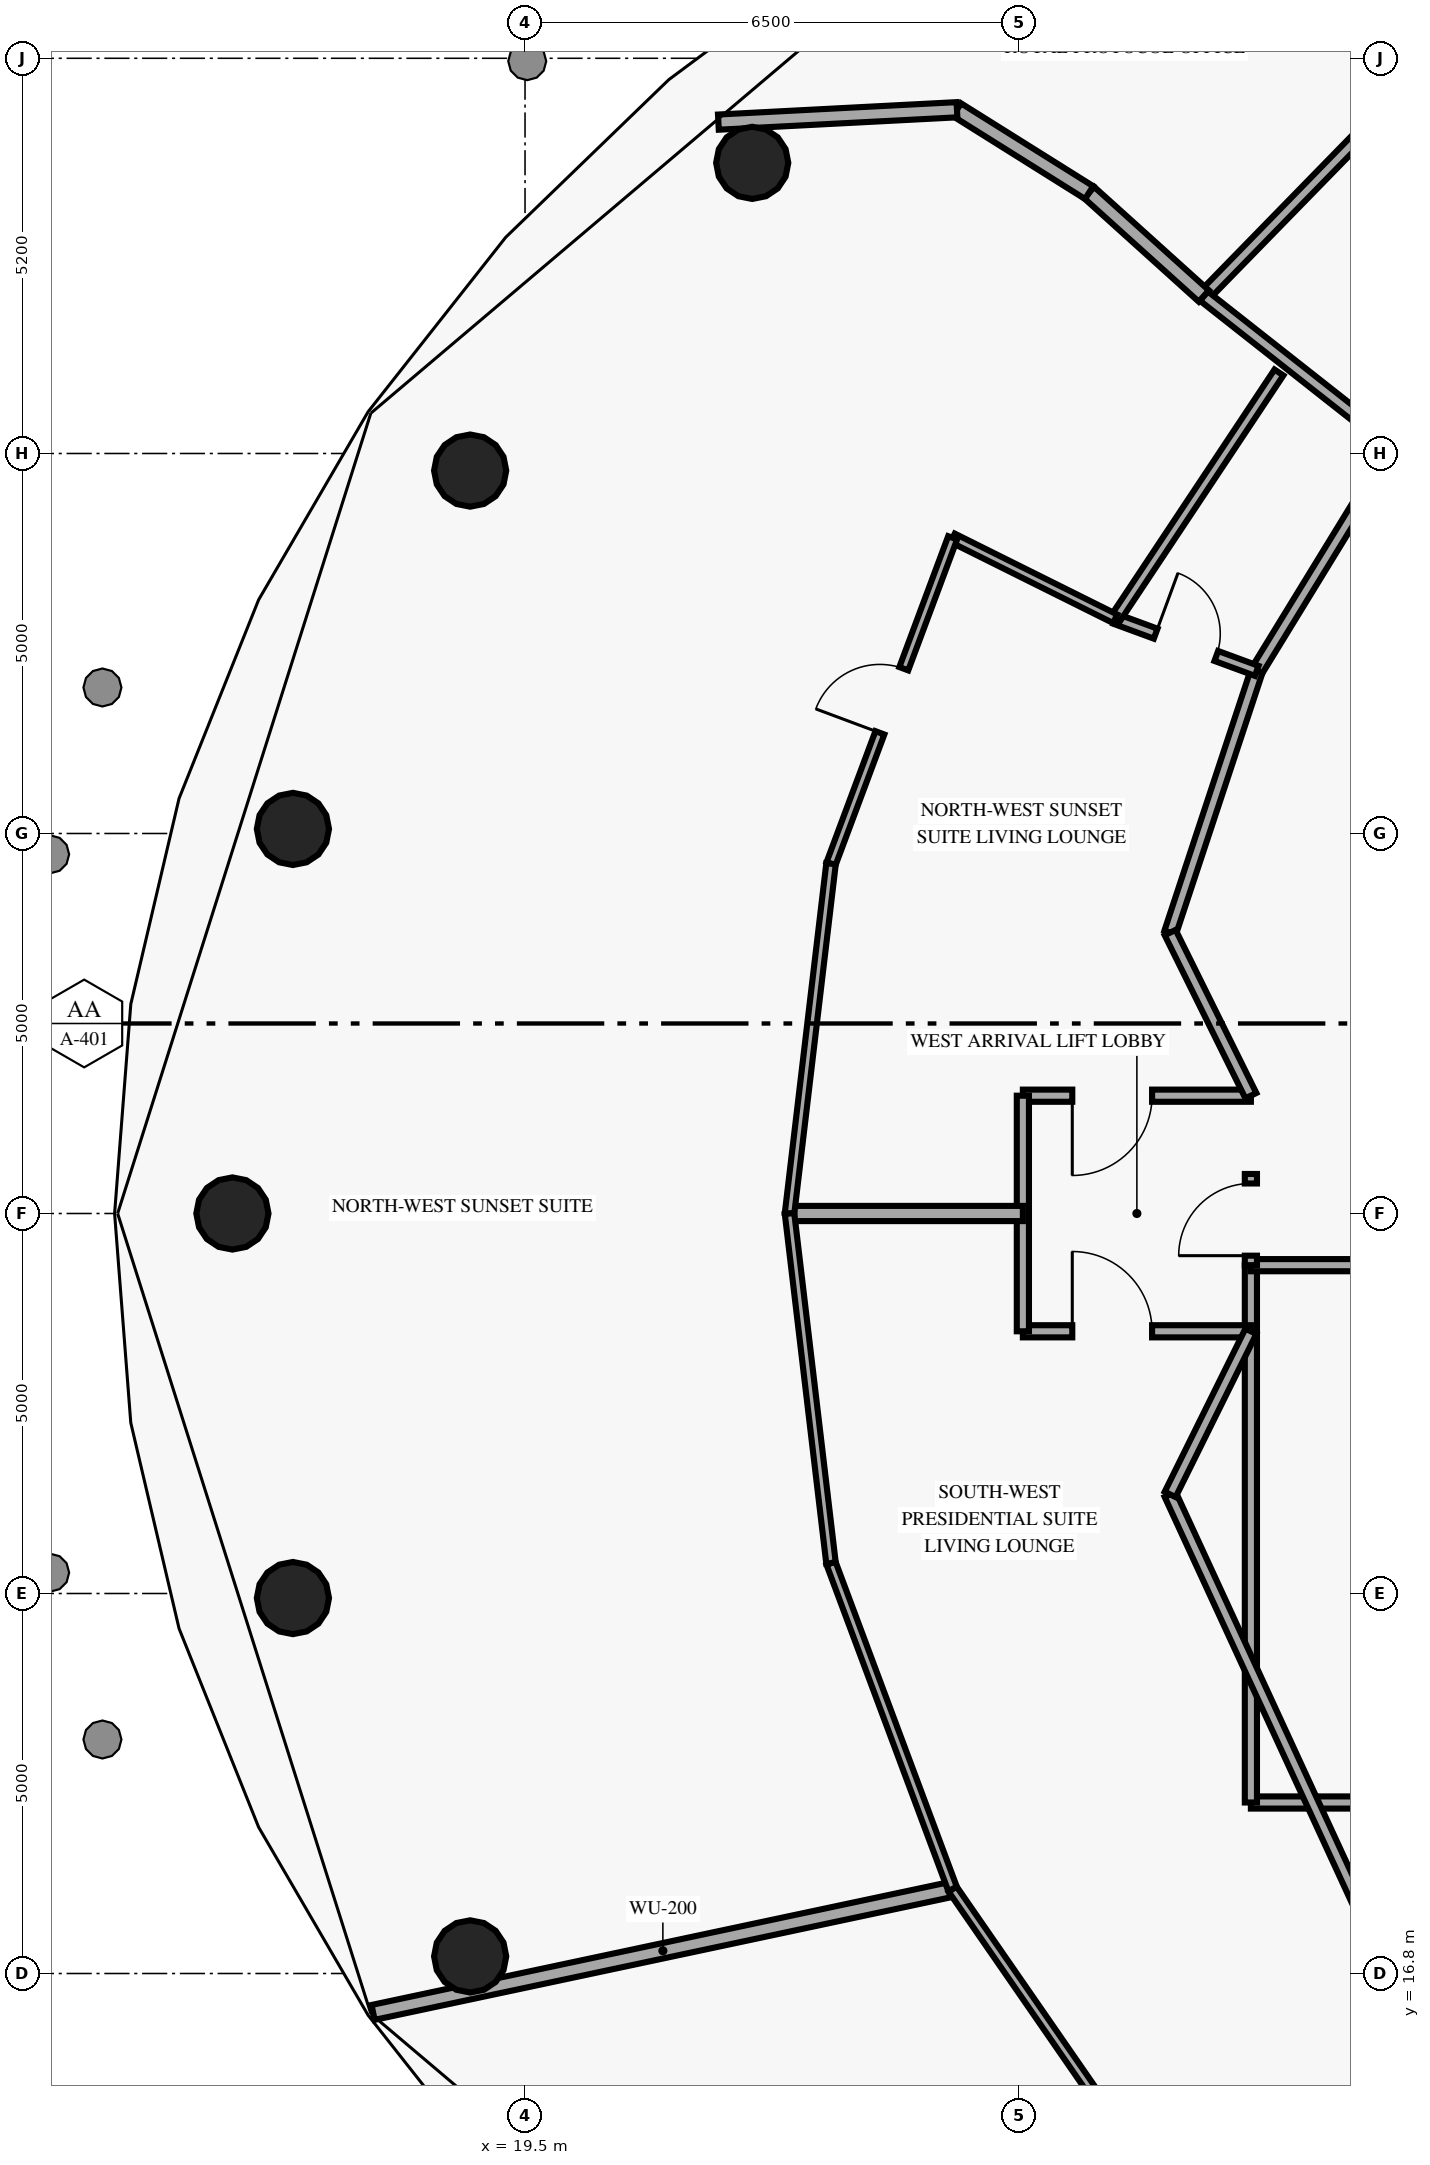
"""IFC4 building model, lengths in metres.
Left out: names, types, materials, properties, quantities, classifications, styles, units other than length and angle.
Written with IfcOpenShell. Run it as: python <this file> out.ifc"""

import sys

from ifc_helpers import new_model, si_unit, direction, frame, frame_2d, origin, origin_2d, place, context, subcontext, project, spatial, rectangle, circle, extrude, element, fill, save


model = new_model("IFC4")
c1 = context("Model", 3, precision=1e-05, world=origin(), true_north=direction((0.0, 1.0)))
c2 = subcontext(c1, "Body", "Model", "MODEL_VIEW")
j1 = project(units=[si_unit("LENGTHUNIT", "METRE"), si_unit("PLANEANGLEUNIT", "RADIAN")], contexts=[c1])
p1 = place(None, origin())
s1 = spatial("IfcSite", under=j1, at=p1, CompositionType="ELEMENT")
p2 = place(p1, origin())
s2 = spatial("IfcBuilding", under=s1, at=p2, CompositionType="ELEMENT")
p3 = place(p2, frame((0.0, 0.0, 192.25)))
s3 = spatial("IfcBuildingStorey", under=s2, at=p3, CompositionType="ELEMENT", Elevation=192.25)
for number, where, z_axis, x_axis in (
    (1, (22.489, 40.624, 0.0), (0.0, 0.0, 1.0), (1.0, 0.0, 0.0)),
    (2, (18.778, 36.575, 0.0), (0.0, 0.0, 1.0), (1.0, 0.0, 0.0)),
    (3, (16.446, 31.86, 0.0), (0.0, 0.0, 1.0), (1.0, 0.0, 0.0)),
    (4, (15.65, 26.8, 0.0), (0.0, 0.0, 1.0), (1.0, 0.0, 0.0)),
    (5, (16.446, 21.74, 0.0), (0.0, 0.0, 1.0), (1.0, 0.0, 0.0)),
    (6, (18.778, 17.025, 0.0), (0.0, 0.0, 1.0), (1.0, 0.0, 0.0)),
):
    element("IfcColumn", number, at=place(p3, frame(where, z_axis=z_axis, x_axis=x_axis)), inside=s3, PredefinedType="COLUMN", context=c2, shape_type="SweptSolid", body=[
        extrude(circle(Radius=0.475, at=origin_2d()), origin(), (0.0, 0.0, 1.0), 3.35),
    ])
p4 = place(p3, frame((29.05, 19.05, 0.0), z_axis=(0.0, 0.0, 1.0), x_axis=(1.0, 0.0, 0.0)))
e7 = element("IfcWall", 7, at=p4, inside=s3, PredefinedType="PARTITIONING", context=c2, shape_type="SweptSolid", body=[
    extrude(rectangle(XDim=4.65, YDim=0.16, at=frame_2d((2.325, 0.0))), origin(), (0.0, 0.0, 1.0), 3.35),
])
p5 = place(p3, frame((29.05, 19.05, 0.0), z_axis=(0.0, 0.0, 1.0), x_axis=(0.0, 1.0, 0.0)))
e8 = element("IfcWall", 8, at=p5, inside=s3, PredefinedType="PARTITIONING", context=c2, shape_type="SweptSolid", body=[
    extrude(rectangle(XDim=7.07, YDim=0.16, at=frame_2d((3.535, 0.0))), origin(), (0.0, 0.0, 1.0), 3.35),
])
p6 = place(p3, frame((33.7, 26.12, 0.0), z_axis=(0.0, 0.0, 1.0), x_axis=(-1.0, 0.0, 0.0)))
e9 = element("IfcWall", 9, at=p6, inside=s3, PredefinedType="PARTITIONING", context=c2, shape_type="SweptSolid", body=[
    extrude(rectangle(XDim=4.65, YDim=0.16, at=frame_2d((2.325, 0.0))), origin(), (0.0, 0.0, 1.0), 3.35),
])
p7 = place(p6, frame((1.875, 0.0, 0.0)))
e10 = element("IfcOpeningElement", 10, at=p7, cuts=e9, PredefinedType="OPENING", context=c2, shape_type="SweptSolid", body=[
    extrude(rectangle(XDim=0.9, YDim=2.1, at=frame_2d((0.45, 1.05))), frame((0.0, 0.09, 0.0), z_axis=(0.0, -1.0, 0.0), x_axis=(1.0, 0.0, 0.0)), (0.0, 0.0, 1.0), 0.18),
])
p8 = place(p3, frame((29.05, 26.12, 0.0), z_axis=(0.0, 0.0, 1.0), x_axis=(0.0, 1.0, 0.0)))
e11 = element("IfcWall", 11, at=p8, inside=s3, PredefinedType="PARTITIONING", context=c2, shape_type="SweptSolid", body=[
    extrude(rectangle(XDim=1.2, YDim=0.16, at=frame_2d((0.6, 0.0))), origin(), (0.0, 0.0, 1.0), 3.35),
])
p9 = place(p8, frame((0.125, 0.0, 0.0)))
e12 = element("IfcOpeningElement", 12, at=p9, cuts=e11, PredefinedType="OPENING", context=c2, shape_type="SweptSolid", body=[
    extrude(rectangle(XDim=0.95, YDim=2.15, at=frame_2d((0.475, 1.075))), frame((0.0, 0.09, 0.0), z_axis=(0.0, -1.0, 0.0), x_axis=(1.0, 0.0, 0.0)), (0.0, 0.0, 1.0), 0.18),
])
p10 = place(p3, frame((31.374, 41.888, 0.0), z_axis=(0.0, 0.0, 1.0), x_axis=(-0.698421583202, -0.715686587913, 0.0)))
e13 = element("IfcWall", 13, at=p10, inside=s3, PredefinedType="PARTITIONING", context=c2, shape_type="SweptSolid", body=[
    extrude(rectangle(XDim=4.214, YDim=0.16, at=frame_2d((2.107, 0.0))), origin(), (0.0, 0.0, 1.0), 3.35),
])
p11 = place(p3, frame((30.939, 36.897, 0.0), z_axis=(0.0, 0.0, 1.0), x_axis=(-0.785635850026, 0.618689187843, 0.0)))
e14 = element("IfcWall", 14, at=p11, inside=s3, PredefinedType="PARTITIONING", context=c2, shape_type="SweptSolid", body=[
    extrude(rectangle(XDim=3.192, YDim=0.16, at=frame_2d((1.596, 0.0))), origin(), (0.0, 0.0, 1.0), 3.35),
])
p12 = place(p3, frame((28.431, 38.872, 0.0), z_axis=(0.0, 0.0, 1.0), x_axis=(-0.742576754187, 0.669760975379, 0.0)))
e15 = element("IfcWall", 15, at=p12, inside=s3, PredefinedType="PARTITIONING", context=c2, shape_type="SweptSolid", body=[
    extrude(rectangle(XDim=2.032, YDim=0.2, at=frame_2d((1.016, 0.0))), origin(), (0.0, 0.0, 1.0), 3.35),
])
p13 = place(p3, frame((26.922, 40.233, 0.0), z_axis=(0.0, 0.0, 1.0), x_axis=(-0.847295877025, 0.53112116958, 0.0)))
e16 = element("IfcWall", 16, at=p13, inside=s3, PredefinedType="PARTITIONING", context=c2, shape_type="SweptSolid", body=[
    extrude(rectangle(XDim=2.052, YDim=0.2, at=frame_2d((1.026, 0.0))), origin(), (0.0, 0.0, 1.0), 3.35),
])
p14 = place(p3, frame((25.183, 41.323, 0.0), z_axis=(0.0, 0.0, 1.0), x_axis=(-0.9986532157, -0.051882123821, 0.0)))
e17 = element("IfcWall", 17, at=p14, inside=s3, PredefinedType="PARTITIONING", context=c2, shape_type="SweptSolid", body=[
    extrude(rectangle(XDim=3.143, YDim=0.2, at=frame_2d((1.572, 0.0))), origin(), (0.0, 0.0, 1.0), 3.35),
])
p15 = place(p3, frame((30.939, 36.897, 0.0), z_axis=(0.0, 0.0, 1.0), x_axis=(-0.522486120877, -0.852647789823, 0.0)))
e18 = element("IfcWall", 18, at=p15, inside=s3, PredefinedType="PARTITIONING", context=c2, shape_type="SweptSolid", body=[
    extrude(rectangle(XDim=3.468, YDim=0.16, at=frame_2d((1.734, 0.0))), origin(), (0.0, 0.0, 1.0), 3.35),
])
p16 = place(p3, frame((29.127, 33.94, 0.0), z_axis=(0.0, 0.0, 1.0), x_axis=(-0.313985571683, -0.949427754374, 0.0)))
e19 = element("IfcWall", 19, at=p16, inside=s3, PredefinedType="PARTITIONING", context=c2, shape_type="SweptSolid", body=[
    extrude(rectangle(XDim=3.627, YDim=0.16, at=frame_2d((1.813, 0.0))), origin(), (0.0, 0.0, 1.0), 3.35),
])
p17 = place(p3, frame((27.988, 23.104, 0.0), z_axis=(0.0, 0.0, 1.0), x_axis=(0.418656179426, -0.908144814128, 0.0)))
e20 = element("IfcWall", 20, at=p17, inside=s3, PredefinedType="PARTITIONING", context=c2, shape_type="SweptSolid", body=[
    extrude(rectangle(XDim=7.049, YDim=0.16, at=frame_2d((3.524, 0.0))), origin(), (0.0, 0.0, 1.0), 3.35),
])
p18 = place(p3, frame((26.05, 28.35, 0.0), z_axis=(0.0, 0.0, 1.0), x_axis=(1.0, 0.0, 0.0)))
e21 = element("IfcWall", 21, at=p18, inside=s3, PredefinedType="PARTITIONING", context=c2, shape_type="SweptSolid", body=[
    extrude(rectangle(XDim=3.0, YDim=0.16, at=frame_2d((1.5, 0.0))), origin(), (0.0, 0.0, 1.0), 2.31),
])
p19 = place(p18, frame((0.65, 0.0, 0.0)))
e22 = element("IfcOpeningElement", 22, at=p19, cuts=e21, PredefinedType="OPENING", context=c2, shape_type="SweptSolid", body=[
    extrude(rectangle(XDim=1.05, YDim=2.15, at=frame_2d((0.525, 1.075))), frame((0.0, 0.09, 0.0), z_axis=(0.0, -1.0, 0.0), x_axis=(1.0, 0.0, 0.0)), (0.0, 0.0, 1.0), 0.18),
])
p20 = place(p3, frame((26.05, 25.25, 0.0), z_axis=(0.0, 0.0, 1.0), x_axis=(1.0, 0.0, 0.0)))
e23 = element("IfcWall", 23, at=p20, inside=s3, PredefinedType="PARTITIONING", context=c2, shape_type="SweptSolid", body=[
    extrude(rectangle(XDim=3.0, YDim=0.16, at=frame_2d((1.5, 0.0))), origin(), (0.0, 0.0, 1.0), 3.35),
])
p21 = place(p20, frame((0.65, 0.0, 0.0)))
e24 = element("IfcOpeningElement", 24, at=p21, cuts=e23, PredefinedType="OPENING", context=c2, shape_type="SweptSolid", body=[
    extrude(rectangle(XDim=1.05, YDim=2.15, at=frame_2d((0.525, 1.075))), frame((0.0, 0.09, 0.0), z_axis=(0.0, -1.0, 0.0), x_axis=(1.0, 0.0, 0.0)), (0.0, 0.0, 1.0), 0.18),
])
p22 = place(p3, frame((26.05, 25.25, 0.0), z_axis=(0.0, 0.0, 1.0), x_axis=(0.0, 1.0, 0.0)))
e25 = element("IfcWall", 25, at=p22, inside=s3, PredefinedType="PARTITIONING", context=c2, shape_type="SweptSolid", body=[
    extrude(rectangle(XDim=3.1, YDim=0.16, at=frame_2d((1.55, 0.0))), origin(), (0.0, 0.0, 1.0), 3.35),
])
for number, where, z_axis, x_axis in (
    (26, (27.988, 30.496, 0.0), (0.0, 0.0, 1.0), (0.444, -0.896, 0.0)),
    (27, (27.988, 23.104, 0.0), (0.0, 0.0, 1.0), (0.444, 0.896, 0.0)),
):
    element("IfcWall", number, at=place(p3, frame(where, z_axis=z_axis, x_axis=x_axis)), inside=s3, PredefinedType="PARTITIONING", context=c2, shape_type="SweptSolid", body=[
        extrude(rectangle(XDim=2.394, YDim=0.16, at=frame_2d((1.197, 0.0))), origin(), (0.0, 0.0, 1.0), 3.35),
    ])
p23 = place(p3, frame((26.05, 26.8, 0.0), z_axis=(0.0, 0.0, 1.0), x_axis=(-1.0, 0.0, 0.0)))
e28 = element("IfcWall", 28, at=p23, inside=s3, PredefinedType="PARTITIONING", context=c2, shape_type="SweptSolid", body=[
    extrude(rectangle(XDim=3.07, YDim=0.2, at=frame_2d((1.535, 0.0))), origin(), (0.0, 0.0, 1.0), 3.35),
])
p24 = place(p3, frame((25.126, 17.91, 0.0), z_axis=(0.0, 0.0, 1.0), x_axis=(-0.978119354701, -0.208044533596, 0.0)))
e29 = element("IfcWall", 29, at=p24, inside=s3, PredefinedType="PARTITIONING", context=c2, shape_type="SweptSolid", body=[
    extrude(rectangle(XDim=7.796, YDim=0.2, at=frame_2d((3.898, 0.0))), origin(), (0.0, 0.0, 1.0), 3.35),
])
p25 = place(p3, frame((27.265, 34.625, 0.0), z_axis=(0.0, 0.0, 1.0), x_axis=(0.938500583084, -0.345277649945, 0.0)))
e30 = element("IfcWall", 30, at=p25, inside=s3, PredefinedType="PARTITIONING", context=c2, shape_type="SweptSolid", body=[
    extrude(rectangle(XDim=1.984, YDim=0.14, at=frame_2d((0.992, 0.0))), origin(), (0.0, 0.0, 1.0), 3.35),
])
p26 = place(p25, frame((0.567, 0.0, 0.0)))
e31 = element("IfcOpeningElement", 31, at=p26, cuts=e30, PredefinedType="OPENING", context=c2, shape_type="SweptSolid", body=[
    extrude(rectangle(XDim=0.85, YDim=2.1, at=frame_2d((0.425, 1.05))), frame((0.0, 0.08, 0.0), z_axis=(0.0, -1.0, 0.0), x_axis=(1.0, 0.0, 0.0)), (0.0, 0.0, 1.0), 0.16),
])
p27 = place(p3, frame((29.419, 37.866, 0.0), z_axis=(0.0, 0.0, 1.0), x_axis=(-0.553526949376, -0.832831265212, 0.0)))
e32 = element("IfcWall", 32, at=p27, inside=s3, PredefinedType="PARTITIONING", context=c2, shape_type="SweptSolid", body=[
    extrude(rectangle(XDim=3.892, YDim=0.14, at=frame_2d((1.946, 0.0))), origin(), (0.0, 0.0, 1.0), 3.35),
])
p28 = place(p3, frame((27.265, 34.625, 0.0), z_axis=(0.0, 0.0, 1.0), x_axis=(-0.895182030291, 0.445700720937, 0.0)))
e33 = element("IfcWall", 33, at=p28, inside=s3, PredefinedType="PARTITIONING", context=c2, shape_type="SweptSolid", body=[
    extrude(rectangle(XDim=2.389, YDim=0.125, at=frame_2d((1.195, 0.0))), origin(), (0.0, 0.0, 1.0), 3.35),
])
p29 = place(p3, frame((25.126, 35.69, 0.0), z_axis=(0.0, 0.0, 1.0), x_axis=(-0.349620571525, -0.936891378958, 0.0)))
e34 = element("IfcWall", 34, at=p29, inside=s3, PredefinedType="PARTITIONING", context=c2, shape_type="SweptSolid", body=[
    extrude(rectangle(XDim=4.577, YDim=0.125, at=frame_2d((2.288, 0.0))), origin(), (0.0, 0.0, 1.0), 3.35),
])
p30 = place(p29, frame((1.838, 0.0, 0.0)))
e35 = element("IfcOpeningElement", 35, at=p30, cuts=e34, PredefinedType="OPENING", context=c2, shape_type="SweptSolid", body=[
    extrude(rectangle(XDim=0.9, YDim=2.1, at=frame_2d((0.45, 1.05))), frame((0.0, 0.073, 0.0), z_axis=(0.0, -1.0, 0.0), x_axis=(1.0, 0.0, 0.0)), (0.0, 0.0, 1.0), 0.145),
])
for number, where, z_axis, x_axis in (
    (36, (23.526, 31.402, 0.0), (0.0, 0.0, 1.0), (-0.118, -0.993, 0.0)),
    (37, (22.98, 26.8, 0.0), (0.0, 0.0, 1.0), (0.118, -0.993, 0.0)),
):
    element("IfcWall", number, at=place(p3, frame(where, z_axis=z_axis, x_axis=x_axis)), inside=s3, PredefinedType="PARTITIONING", context=c2, shape_type="SweptSolid", body=[
        extrude(rectangle(XDim=4.634, YDim=0.125, at=frame_2d((2.317, 0.0))), origin(), (0.0, 0.0, 1.0), 3.35),
    ])
p31 = place(p3, frame((23.526, 22.198, 0.0), z_axis=(0.0, 0.0, 1.0), x_axis=(0.349603098964, -0.936897899024, 0.0)))
e38 = element("IfcWall", 38, at=p31, inside=s3, PredefinedType="PARTITIONING", context=c2, shape_type="SweptSolid", body=[
    extrude(rectangle(XDim=4.577, YDim=0.125, at=frame_2d((2.289, 0.0))), origin(), (0.0, 0.0, 1.0), 3.35),
])
p32 = place(p3, frame((25.126, 17.91, 0.0), z_axis=(0.0, 0.0, 1.0), x_axis=(0.568778830708, -0.822490511641, 0.0)))
e39 = element("IfcWall", 39, at=p32, inside=s3, PredefinedType="PARTITIONING", context=c2, shape_type="SweptSolid", body=[
    extrude(rectangle(XDim=4.477, YDim=0.125, at=frame_2d((2.238, 0.0))), origin(), (0.0, 0.0, 1.0), 3.35),
])
p33 = place(p9, origin())
e40 = element("IfcDoor", 40, at=p33, inside=s3, OperationType="SINGLE_SWING_RIGHT", PredefinedType="DOOR", context=c2, shape_type="SweptSolid", body=[
    extrude(rectangle(XDim=0.95, YDim=2.15, at=frame_2d((0.475, 1.075))), frame((0.0, 0.025, 0.0), z_axis=(0.0, -1.0, 0.0), x_axis=(1.0, 0.0, 0.0)), (0.0, 0.0, 1.0), 0.05),
])
fill(e12, e40)
p34 = place(p19, origin())
e41 = element("IfcDoor", 41, at=p34, inside=s3, OperationType="SINGLE_SWING_LEFT", PredefinedType="DOOR", context=c2, shape_type="SweptSolid", body=[
    extrude(rectangle(XDim=1.05, YDim=2.15, at=frame_2d((0.525, 1.075))), frame((0.0, 0.025, 0.0), z_axis=(0.0, -1.0, 0.0), x_axis=(1.0, 0.0, 0.0)), (0.0, 0.0, 1.0), 0.05),
])
fill(e22, e41)
p35 = place(p21, origin())
e42 = element("IfcDoor", 42, at=p35, inside=s3, OperationType="SINGLE_SWING_LEFT", PredefinedType="DOOR", context=c2, shape_type="SweptSolid", body=[
    extrude(rectangle(XDim=1.05, YDim=2.15, at=frame_2d((0.525, 1.075))), frame((0.0, 0.025, 0.0), z_axis=(0.0, -1.0, 0.0), x_axis=(1.0, 0.0, 0.0)), (0.0, 0.0, 1.0), 0.05),
])
fill(e24, e42)
p36 = place(p26, origin())
e43 = element("IfcDoor", 43, at=p36, inside=s3, OperationType="SINGLE_SWING_LEFT", PredefinedType="DOOR", context=c2, shape_type="SweptSolid", body=[
    extrude(rectangle(XDim=0.85, YDim=2.1, at=frame_2d((0.425, 1.05))), frame((0.0, 0.025, 0.0), z_axis=(0.0, -1.0, 0.0), x_axis=(1.0, 0.0, 0.0)), (0.0, 0.0, 1.0), 0.05),
])
fill(e31, e43)
p37 = place(p30, origin())
e44 = element("IfcDoor", 44, at=p37, inside=s3, OperationType="SINGLE_SWING_RIGHT", PredefinedType="DOOR", context=c2, shape_type="SweptSolid", body=[
    extrude(rectangle(XDim=0.9, YDim=2.1, at=frame_2d((0.45, 1.05))), frame((0.0, 0.025, 0.0), z_axis=(0.0, -1.0, 0.0), x_axis=(1.0, 0.0, 0.0)), (0.0, 0.0, 1.0), 0.05),
])
fill(e35, e44)
save(model, sys.argv[1])
